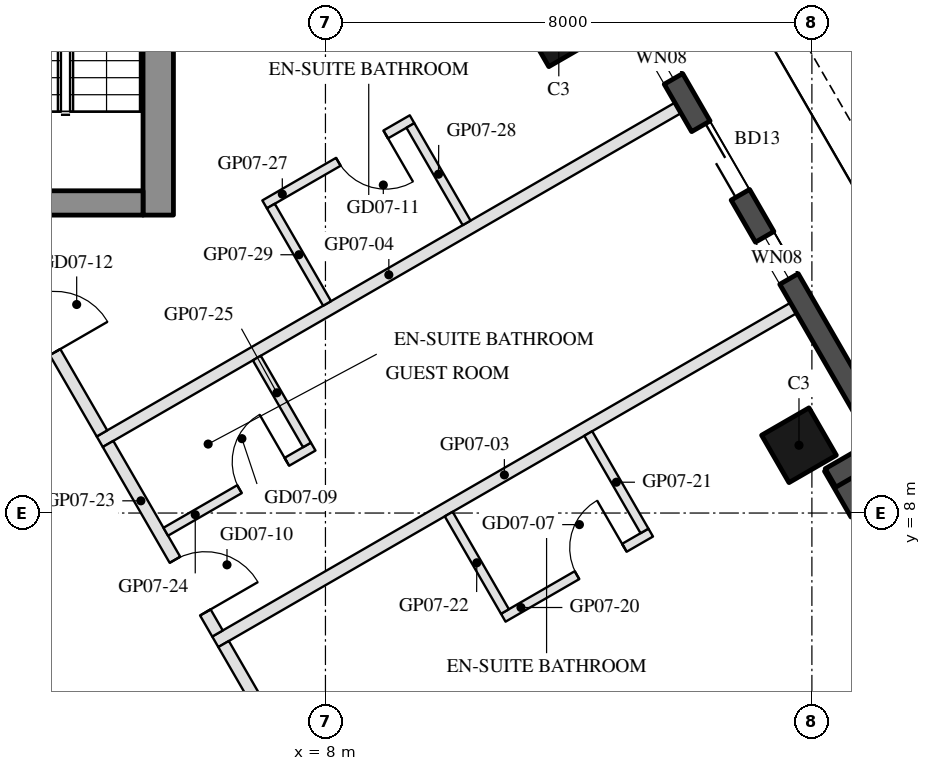
"""IFC4 building model, lengths in metres.
Left out: names, types, materials, properties, quantities, classifications, styles, units other than length and angle.
Written with IfcOpenShell. Run it as: python <this file> out.ifc"""

import sys

from ifc_helpers import new_model, si_unit, direction, frame, frame_2d, origin, origin_2d, place, context, subcontext, project, spatial, rectangle, hollow_rectangle, extrude, element, fill, save


model = new_model("IFC4")
c1 = context("Model", 3, precision=1e-05, world=origin(), true_north=direction((0.0, 1.0)))
c2 = subcontext(c1, "Body", "Model", "MODEL_VIEW")
j1 = project(units=[si_unit("LENGTHUNIT", "METRE"), si_unit("PLANEANGLEUNIT", "RADIAN")], contexts=[c1])
p1 = place(None, origin())
s1 = spatial("IfcSite", under=j1, at=p1, CompositionType="ELEMENT")
p2 = place(p1, origin())
s2 = spatial("IfcBuilding", under=s1, at=p2, CompositionType="ELEMENT")
p3 = place(p2, frame((0.0, 0.0, 98.3)))
s3 = spatial("IfcBuildingStorey", under=s2, at=p3, CompositionType="ELEMENT", Elevation=98.3)
for number, where, z_axis, x_axis in (
    (1, (15.788, 9.115, 0.0), (0.0, 0.0, 1.0), (-0.5, 0.866, 0.0)),
    (2, (11.838, 15.957, 0.0), (0.0, 0.0, 1.0), (-0.5, 0.866, 0.0)),
):
    element("IfcColumn", number, at=place(p3, frame(where, z_axis=z_axis, x_axis=x_axis)), inside=s3, PredefinedType="COLUMN", context=c2, shape_type="SweptSolid", body=[
        extrude(hollow_rectangle(XDim=0.9, YDim=0.9, WallThickness=0.04, at=origin_2d()), origin(), (0.0, 0.0, 1.0), 3.7),
    ])
p4 = place(p3, frame((19.729, 2.938, 0.0), z_axis=(0.0, 0.0, 1.0), x_axis=(-0.499976430342, 0.866039011305, 0.0)))
e3 = element("IfcWall", 3, at=p4, inside=s3, PredefinedType="SOLIDWALL", context=c2, shape_type="SweptSolid", body=[
    extrude(rectangle(XDim=6.74, YDim=0.35, at=frame_2d((3.37, 0.0))), origin(), (0.0, 0.0, 1.0), 3.55),
])
p5 = place(p4, frame((0.77, 0.0, 0.3)))
e4 = element("IfcOpeningElement", 4, at=p5, cuts=e3, PredefinedType="OPENING", context=c2, shape_type="SweptSolid", body=[
    extrude(rectangle(XDim=2.4, YDim=2.65, at=frame_2d((1.2, 1.325))), frame((0.0, 0.185, 0.0), z_axis=(0.0, -1.0, 0.0), x_axis=(1.0, 0.0, 0.0)), (0.0, 0.0, 1.0), 0.37),
])
p6 = place(p4, frame((3.47, 0.0, 0.3)))
e5 = element("IfcOpeningElement", 5, at=p6, cuts=e3, PredefinedType="OPENING", context=c2, shape_type="SweptSolid", body=[
    extrude(rectangle(XDim=2.4, YDim=2.65, at=frame_2d((1.2, 1.325))), frame((0.0, 0.185, 0.0), z_axis=(0.0, -1.0, 0.0), x_axis=(1.0, 0.0, 0.0)), (0.0, 0.0, 1.0), 0.37),
])
p7 = place(p3, frame((16.306, 8.577, 0.0), z_axis=(0.0, 0.0, 1.0), x_axis=(0.866092288191, 0.499884134912, 0.0)))
e6 = element("IfcWall", 6, at=p7, inside=s3, PredefinedType="SOLIDWALL", context=c2, shape_type="SweptSolid", body=[
    extrude(rectangle(XDim=1.22, YDim=0.35, at=frame_2d((0.61, 0.0))), origin(), (0.0, 0.0, 1.0), 3.55),
])
p8 = place(p3, frame((17.299, 8.948, 0.0), z_axis=(0.0, 0.0, 1.0), x_axis=(-0.500010041276, 0.866019606374, 0.0)))
e7 = element("IfcWall", 7, at=p8, inside=s3, PredefinedType="SOLIDWALL", context=c2, shape_type="SweptSolid", body=[
    extrude(rectangle(XDim=9.7, YDim=0.35, at=frame_2d((4.85, 0.0))), origin(), (0.0, 0.0, 1.0), 3.55),
])
p9 = place(p8, frame((3.351, 0.0, 0.3)))
e8 = element("IfcOpeningElement", 8, at=p9, cuts=e7, PredefinedType="OPENING", context=c2, shape_type="SweptSolid", body=[
    extrude(rectangle(XDim=0.8, YDim=2.65, at=frame_2d((0.4, 1.325))), frame((0.0, 0.185, 0.0), z_axis=(0.0, -1.0, 0.0), x_axis=(1.0, 0.0, 0.0)), (0.0, 0.0, 1.0), 0.37),
])
p10 = place(p8, frame((4.95, 0.0, 0.0)))
e9 = element("IfcOpeningElement", 9, at=p10, cuts=e7, PredefinedType="OPENING", context=c2, shape_type="SweptSolid", body=[
    extrude(rectangle(XDim=1.3, YDim=2.4, at=frame_2d((0.65, 1.2))), frame((0.0, 0.185, 0.0), z_axis=(0.0, -1.0, 0.0), x_axis=(1.0, 0.0, 0.0)), (0.0, 0.0, 1.0), 0.37),
])
p11 = place(p8, frame((7.15, 0.0, 0.3)))
e10 = element("IfcOpeningElement", 10, at=p11, cuts=e7, PredefinedType="OPENING", context=c2, shape_type="SweptSolid", body=[
    extrude(rectangle(XDim=0.8, YDim=2.65, at=frame_2d((0.4, 1.325))), frame((0.0, 0.185, 0.0), z_axis=(0.0, -1.0, 0.0), x_axis=(1.0, 0.0, 0.0)), (0.0, 0.0, 1.0), 0.37),
])
p12 = place(p3, frame((5.25, 12.9, 0.0), z_axis=(0.0, 0.0, 1.0), x_axis=(0.0, 1.0, 0.0)))
e11 = element("IfcWall", 11, at=p12, inside=s3, PredefinedType="SHEAR", context=c2, shape_type="SweptSolid", body=[
    extrude(rectangle(XDim=14.837, YDim=0.5, at=frame_2d((7.418, 0.0))), origin(), (0.0, 0.0, 1.0), 3.5),
])
p13 = place(p3, frame((5.0, 13.1, 0.0), z_axis=(0.0, 0.0, 1.0), x_axis=(-1.0, 0.0, 0.0)))
e12 = element("IfcWall", 12, at=p13, inside=s3, PredefinedType="SHEAR", context=c2, shape_type="SweptSolid", body=[
    extrude(rectangle(XDim=10.0, YDim=0.4, at=frame_2d((5.0, 0.0))), origin(), (0.0, 0.0, 1.0), 3.5),
])
p14 = place(p13, frame((3.55, 0.0, 0.0)))
e13 = element("IfcOpeningElement", 13, at=p14, cuts=e12, PredefinedType="OPENING", context=c2, shape_type="SweptSolid", body=[
    extrude(rectangle(XDim=1.1, YDim=2.1, at=frame_2d((0.55, 1.05))), frame((0.0, 0.21, 0.0), z_axis=(0.0, -1.0, 0.0), x_axis=(1.0, 0.0, 0.0)), (0.0, 0.0, 1.0), 0.42),
])
p15 = place(p13, frame((5.85, 0.0, 0.0)))
e14 = element("IfcOpeningElement", 14, at=p15, cuts=e12, PredefinedType="OPENING", context=c2, shape_type="SweptSolid", body=[
    extrude(rectangle(XDim=1.4, YDim=2.1, at=frame_2d((0.7, 1.05))), frame((0.0, 0.21, 0.0), z_axis=(0.0, -1.0, 0.0), x_axis=(1.0, 0.0, 0.0)), (0.0, 0.0, 1.0), 0.42),
])
for number, where, z_axis, x_axis in (
    (15, (15.697, 11.372, 0.0), (0.0, 0.0, 1.0), (-0.866, -0.5, 0.0)),
    (16, (13.797, 14.663, 0.0), (0.0, 0.0, 1.0), (-0.866, -0.5, 0.0)),
):
    element("IfcWall", number, at=place(p3, frame(where, z_axis=z_axis, x_axis=x_axis)), inside=s3, PredefinedType="PARTITIONING", context=c2, shape_type="SweptSolid", body=[
        extrude(rectangle(XDim=10.98, YDim=0.2, at=frame_2d((5.49, 0.0))), origin(), (0.0, 0.0, 1.0), 2.96),
    ])
p16 = place(p3, frame((6.325, 5.845, 0.0), z_axis=(0.0, 0.0, 1.0), x_axis=(0.500002143212, -0.866024166397, 0.0)))
e17 = element("IfcWall", 17, at=p16, inside=s3, PredefinedType="PARTITIONING", context=c2, shape_type="SweptSolid", body=[
    extrude(rectangle(XDim=11.888, YDim=0.2, at=frame_2d((5.944, 0.0))), origin(), (0.0, 0.0, 1.0), 2.95),
])
p17 = place(p16, frame((5.444, 0.0, 0.0)))
e18 = element("IfcOpeningElement", 18, at=p17, cuts=e17, PredefinedType="OPENING", context=c2, shape_type="SweptSolid", body=[
    extrude(rectangle(XDim=1.0, YDim=2.1, at=frame_2d((0.5, 1.05))), frame((0.0, 0.11, 0.0), z_axis=(0.0, -1.0, 0.0), x_axis=(1.0, 0.0, 0.0)), (0.0, 0.0, 1.0), 0.22),
])
p18 = place(p3, frame((10.924, 6.278, 0.0), z_axis=(0.0, 0.0, 1.0), x_axis=(0.866056369097, 0.49994636267, 0.0)))
e19 = element("IfcWall", 19, at=p18, inside=s3, PredefinedType="PARTITIONING", context=c2, shape_type="SweptSolid", body=[
    extrude(rectangle(XDim=2.8, YDim=0.15, at=frame_2d((1.4, 0.0))), origin(), (0.0, 0.0, 1.0), 2.95),
])
p19 = place(p18, frame((1.4, 0.0, 0.0)))
e20 = element("IfcOpeningElement", 20, at=p19, cuts=e19, PredefinedType="OPENING", context=c2, shape_type="SweptSolid", body=[
    extrude(rectangle(XDim=0.9, YDim=2.1, at=frame_2d((0.45, 1.05))), frame((0.0, 0.085, 0.0), z_axis=(0.0, -1.0, 0.0), x_axis=(1.0, 0.0, 0.0)), (0.0, 0.0, 1.0), 0.17),
])
for number, where, z_axis, x_axis in (
    (21, (13.247, 7.706, 0.0), (0.0, 0.0, 1.0), (-0.5, 0.866, 0.0)),
    (22, (10.952, 6.381, 0.0), (0.0, 0.0, 1.0), (-0.5, 0.866, 0.0)),
):
    element("IfcWall", number, at=place(p3, frame(where, z_axis=z_axis, x_axis=x_axis)), inside=s3, PredefinedType="PARTITIONING", context=c2, shape_type="SweptSolid", body=[
        extrude(rectangle(XDim=1.85, YDim=0.15, at=frame_2d((0.925, 0.0))), origin(), (0.0, 0.0, 1.0), 2.95),
    ])
p20 = place(p3, frame((4.425, 9.136, 0.0), z_axis=(0.0, 0.0, 1.0), x_axis=(0.500041424909, -0.866001485781, 0.0)))
e23 = element("IfcWall", 23, at=p20, inside=s3, PredefinedType="PARTITIONING", context=c2, shape_type="SweptSolid", body=[
    extrude(rectangle(XDim=3.6, YDim=0.2, at=frame_2d((1.8, 0.0))), origin(), (0.0, 0.0, 1.0), 2.95),
])
p21 = place(p20, frame((2.2, 0.0, 0.0)))
e24 = element("IfcOpeningElement", 24, at=p21, cuts=e23, PredefinedType="OPENING", context=c2, shape_type="SweptSolid", body=[
    extrude(rectangle(XDim=1.0, YDim=2.1, at=frame_2d((0.5, 1.05))), frame((0.0, 0.11, 0.0), z_axis=(0.0, -1.0, 0.0), x_axis=(1.0, 0.0, 0.0)), (0.0, 0.0, 1.0), 0.22),
])
p22 = place(p3, frame((5.374, 7.692, 0.0), z_axis=(0.0, 0.0, 1.0), x_axis=(0.865996816683, 0.500049511043, 0.0)))
e25 = element("IfcWall", 25, at=p22, inside=s3, PredefinedType="PARTITIONING", context=c2, shape_type="SweptSolid", body=[
    extrude(rectangle(XDim=2.8, YDim=0.15, at=frame_2d((1.4, 0.0))), origin(), (0.0, 0.0, 1.0), 2.95),
])
p23 = place(p22, frame((1.4, 0.0, 0.0)))
e26 = element("IfcOpeningElement", 26, at=p23, cuts=e25, PredefinedType="OPENING", context=c2, shape_type="SweptSolid", body=[
    extrude(rectangle(XDim=0.9, YDim=2.1, at=frame_2d((0.45, 1.05))), frame((0.0, 0.085, 0.0), z_axis=(0.0, -1.0, 0.0), x_axis=(1.0, 0.0, 0.0)), (0.0, 0.0, 1.0), 0.17),
])
p24 = place(p3, frame((7.696, 9.12, 0.0), z_axis=(0.0, 0.0, 1.0), x_axis=(-0.499974350878, 0.866040211805, 0.0)))
e27 = element("IfcWall", 27, at=p24, inside=s3, PredefinedType="PARTITIONING", context=c2, shape_type="SweptSolid", body=[
    extrude(rectangle(XDim=1.65, YDim=0.15, at=frame_2d((0.825, 0.0))), origin(), (0.0, 0.0, 1.0), 2.95),
])
p25 = place(p3, frame((2.281, 12.85, 0.0), z_axis=(0.0, 0.0, 1.0), x_axis=(0.500011931275, -0.86601851515, 0.0)))
e28 = element("IfcWall", 28, at=p25, inside=s3, PredefinedType="PARTITIONING", context=c2, shape_type="SweptSolid", body=[
    extrude(rectangle(XDim=4.088, YDim=0.2, at=frame_2d((2.044, 0.0))), origin(), (0.0, 0.0, 1.0), 2.95),
])
p26 = place(p25, frame((1.544, 0.0, 0.0)))
e29 = element("IfcOpeningElement", 29, at=p26, cuts=e28, PredefinedType="OPENING", context=c2, shape_type="SweptSolid", body=[
    extrude(rectangle(XDim=1.0, YDim=2.1, at=frame_2d((0.5, 1.05))), frame((0.0, 0.11, 0.0), z_axis=(0.0, -1.0, 0.0), x_axis=(1.0, 0.0, 0.0)), (0.0, 0.0, 1.0), 0.22),
])
p27 = place(p3, frame((9.424, 14.477, 0.0), z_axis=(0.0, 0.0, 1.0), x_axis=(-0.866034573852, -0.49998411664, 0.0)))
e30 = element("IfcWall", 30, at=p27, inside=s3, PredefinedType="PARTITIONING", context=c2, shape_type="SweptSolid", body=[
    extrude(rectangle(XDim=2.8, YDim=0.15, at=frame_2d((1.4, 0.0))), origin(), (0.0, 0.0, 1.0), 2.95),
])
p28 = place(p27, frame((0.5, 0.0, 0.0)))
e31 = element("IfcOpeningElement", 31, at=p28, cuts=e30, PredefinedType="OPENING", context=c2, shape_type="SweptSolid", body=[
    extrude(rectangle(XDim=0.9, YDim=2.1, at=frame_2d((0.45, 1.05))), frame((0.0, 0.085, 0.0), z_axis=(0.0, -1.0, 0.0), x_axis=(1.0, 0.0, 0.0)), (0.0, 0.0, 1.0), 0.17),
])
for number, where, z_axis, x_axis in (
    (32, (10.322, 12.772, 0.0), (0.0, 0.0, 1.0), (-0.5, 0.866, 0.0)),
    (33, (8.027, 11.447, 0.0), (0.0, 0.0, 1.0), (-0.5, 0.866, 0.0)),
):
    element("IfcWall", number, at=place(p3, frame(where, z_axis=z_axis, x_axis=x_axis)), inside=s3, PredefinedType="PARTITIONING", context=c2, shape_type="SweptSolid", body=[
        extrude(rectangle(XDim=1.85, YDim=0.15, at=frame_2d((0.925, 0.0))), origin(), (0.0, 0.0, 1.0), 3.55),
    ])
p29 = place(p9, origin())
e34 = element("IfcWindow", 34, at=p29, inside=s3, PartitioningType="SINGLE_PANEL", PredefinedType="WINDOW", context=c2, shape_type="SweptSolid", body=[
    extrude(rectangle(XDim=0.8, YDim=2.65, at=frame_2d((0.4, 1.325))), frame((0.0, 0.03, 0.0), z_axis=(0.0, -1.0, 0.0), x_axis=(1.0, 0.0, 0.0)), (0.0, 0.0, 1.0), 0.06),
])
fill(e8, e34)
p30 = place(p10, frame((1.3, 0.0, 0.0), z_axis=(0.0, 0.0, 1.0), x_axis=(-1.0, 0.0, 0.0)))
e35 = element("IfcDoor", 35, at=p30, inside=s3, OperationType="SLIDING_TO_LEFT", PredefinedType="DOOR", context=c2, shape_type="SweptSolid", body=[
    extrude(rectangle(XDim=1.3, YDim=2.4, at=frame_2d((0.65, 1.2))), frame((0.0, 0.025, 0.0), z_axis=(0.0, -1.0, 0.0), x_axis=(1.0, 0.0, 0.0)), (0.0, 0.0, 1.0), 0.05),
])
fill(e9, e35)
p31 = place(p11, origin())
e36 = element("IfcWindow", 36, at=p31, inside=s3, PartitioningType="SINGLE_PANEL", PredefinedType="WINDOW", context=c2, shape_type="SweptSolid", body=[
    extrude(rectangle(XDim=0.8, YDim=2.65, at=frame_2d((0.4, 1.325))), frame((0.0, 0.03, 0.0), z_axis=(0.0, -1.0, 0.0), x_axis=(1.0, 0.0, 0.0)), (0.0, 0.0, 1.0), 0.06),
])
fill(e10, e36)
p32 = place(p19, origin())
e37 = element("IfcDoor", 37, at=p32, inside=s3, OperationType="SINGLE_SWING_RIGHT", PredefinedType="DOOR", context=c2, shape_type="SweptSolid", body=[
    extrude(rectangle(XDim=0.9, YDim=2.1, at=frame_2d((0.45, 1.05))), frame((0.0, 0.025, 0.0), z_axis=(0.0, -1.0, 0.0), x_axis=(1.0, 0.0, 0.0)), (0.0, 0.0, 1.0), 0.05),
])
fill(e20, e37)
p33 = place(p23, origin())
e38 = element("IfcDoor", 38, at=p33, inside=s3, OperationType="SINGLE_SWING_RIGHT", PredefinedType="DOOR", context=c2, shape_type="SweptSolid", body=[
    extrude(rectangle(XDim=0.9, YDim=2.1, at=frame_2d((0.45, 1.05))), frame((0.0, 0.025, 0.0), z_axis=(0.0, -1.0, 0.0), x_axis=(1.0, 0.0, 0.0)), (0.0, 0.0, 1.0), 0.05),
])
fill(e26, e38)
p34 = place(p21, origin())
e39 = element("IfcDoor", 39, at=p34, inside=s3, OperationType="SINGLE_SWING_RIGHT", PredefinedType="DOOR", context=c2, shape_type="SweptSolid", body=[
    extrude(rectangle(XDim=1.0, YDim=2.1, at=frame_2d((0.5, 1.05))), frame((0.0, 0.025, 0.0), z_axis=(0.0, -1.0, 0.0), x_axis=(1.0, 0.0, 0.0)), (0.0, 0.0, 1.0), 0.05),
])
fill(e24, e39)
p35 = place(p28, origin())
e40 = element("IfcDoor", 40, at=p35, inside=s3, OperationType="SINGLE_SWING_LEFT", PredefinedType="DOOR", context=c2, shape_type="SweptSolid", body=[
    extrude(rectangle(XDim=0.9, YDim=2.1, at=frame_2d((0.45, 1.05))), frame((0.0, 0.025, 0.0), z_axis=(0.0, -1.0, 0.0), x_axis=(1.0, 0.0, 0.0)), (0.0, 0.0, 1.0), 0.05),
])
fill(e31, e40)
p36 = place(p26, origin())
e41 = element("IfcDoor", 41, at=p36, inside=s3, OperationType="SINGLE_SWING_RIGHT", PredefinedType="DOOR", context=c2, shape_type="SweptSolid", body=[
    extrude(rectangle(XDim=1.0, YDim=2.1, at=frame_2d((0.5, 1.05))), frame((0.0, 0.025, 0.0), z_axis=(0.0, -1.0, 0.0), x_axis=(1.0, 0.0, 0.0)), (0.0, 0.0, 1.0), 0.05),
])
fill(e29, e41)
save(model, sys.argv[1])
